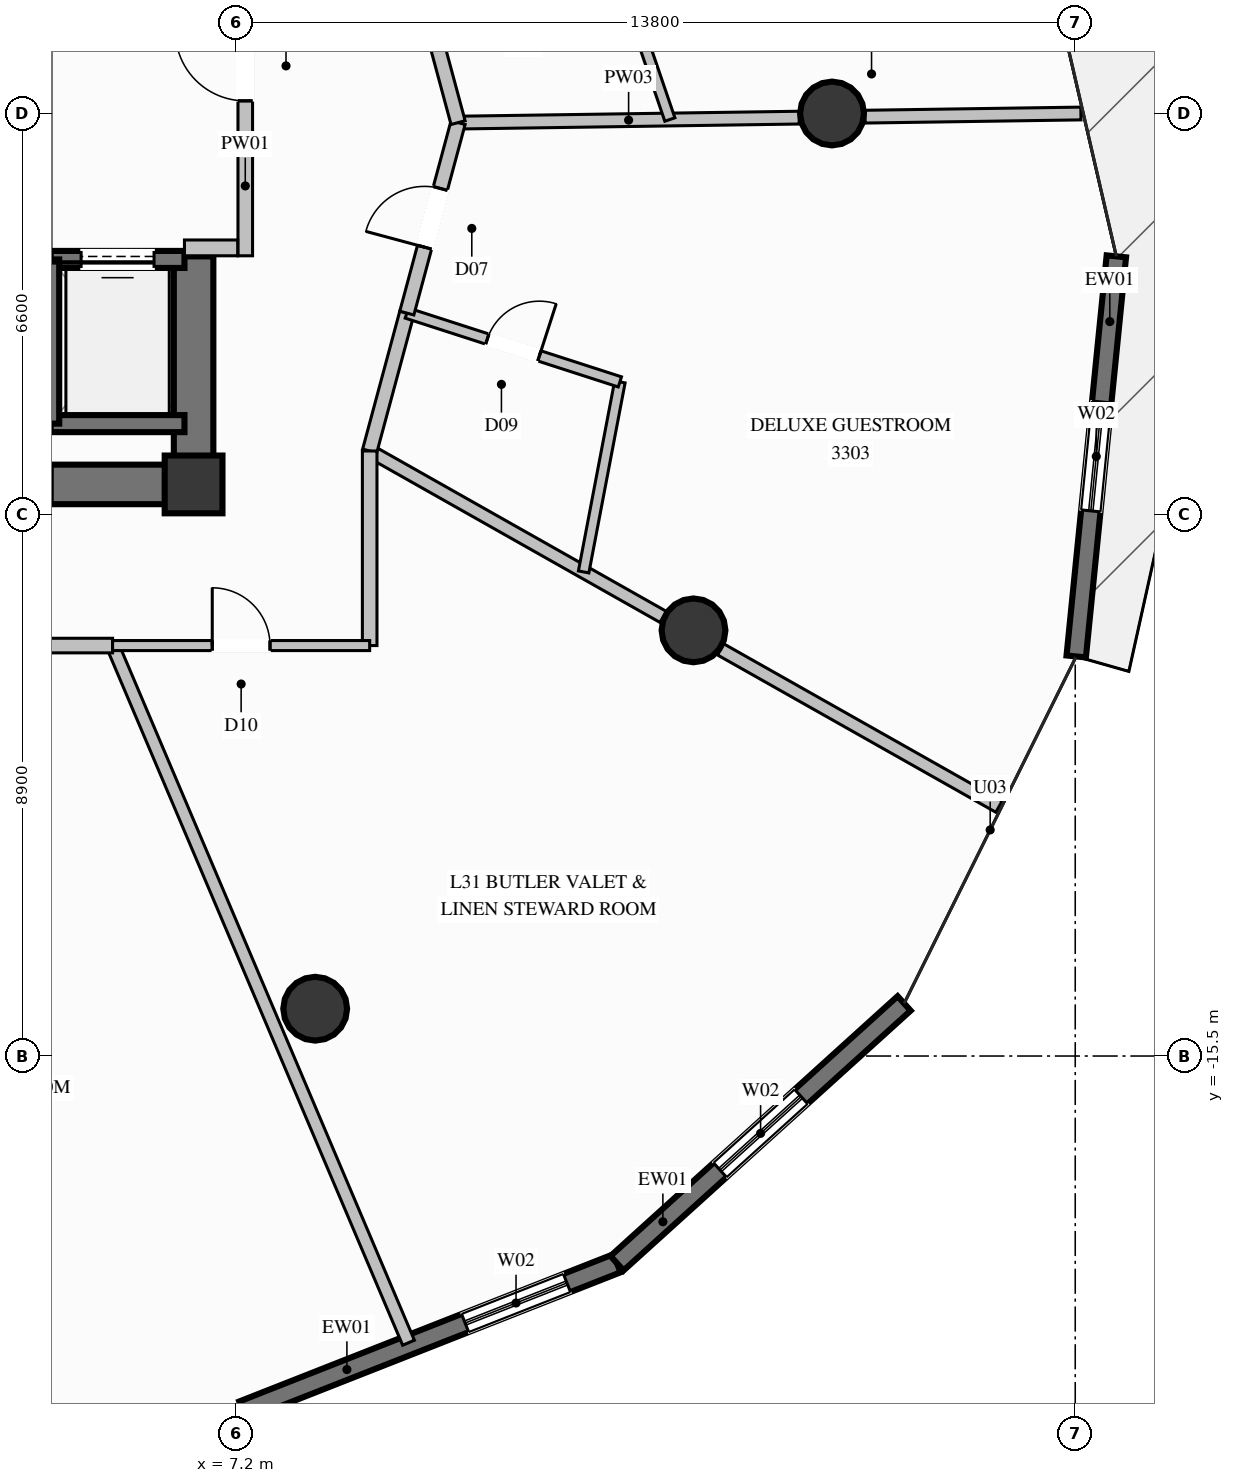
"""IFC4 building model, lengths in metres.
Left out: names, types, materials, properties, quantities, classifications, styles, units other than length and angle.
Written with IfcOpenShell. Run it as: python <this file> out.ifc"""

import sys

from ifc_helpers import new_model, si_unit, direction, frame, frame_2d, origin, origin_2d, place, context, subcontext, project, spatial, rectangle, circle, extrude, element, fill, save


model = new_model("IFC4")
c1 = context("Model", 3, precision=1e-05, world=origin(), true_north=direction((0.0, 1.0)))
c2 = subcontext(c1, "Body", "Model", "MODEL_VIEW")
j1 = project(units=[si_unit("LENGTHUNIT", "METRE"), si_unit("PLANEANGLEUNIT", "RADIAN")], contexts=[c1])
p1 = place(None, origin())
s1 = spatial("IfcSite", under=j1, at=p1, CompositionType="ELEMENT")
p2 = place(p1, origin())
s2 = spatial("IfcBuilding", under=s1, at=p2, CompositionType="ELEMENT")
p3 = place(p2, frame((0.0, 0.0, 124.2)))
s3 = spatial("IfcBuildingStorey", under=s2, at=p3, CompositionType="ELEMENT", Elevation=124.2)
p4 = place(p3, frame((6.5, -6.1, 0.0), z_axis=(0.0, 0.0, 1.0), x_axis=(1.0, 0.0, 0.0)))
e1 = element("IfcColumn", 1, at=p4, inside=s3, PredefinedType="COLUMN", context=c2, shape_type="SweptSolid", body=[
    extrude(rectangle(XDim=0.95, YDim=0.95, at=origin_2d()), origin(), (0.0, 0.0, 1.0), 3.6),
])
p5 = place(p3, frame((4.15, -6.1, 0.0), z_axis=(0.0, 0.0, 1.0), x_axis=(1.0, 0.0, 0.0)))
e2 = element("IfcWall", 2, at=p5, inside=s3, PredefinedType="SHEAR", context=c2, shape_type="SweptSolid", body=[
    extrude(rectangle(XDim=2.025, YDim=0.65, at=frame_2d((1.013, 0.0))), origin(), (0.0, 0.0, 1.0), 3.6),
])
p6 = place(p3, frame((6.5, -6.425, 0.0), z_axis=(0.0, 0.0, 1.0), x_axis=(0.0, 1.0, 0.0)))
e3 = element("IfcWall", 3, at=p6, inside=s3, PredefinedType="SHEAR", context=c2, shape_type="SweptSolid", body=[
    extrude(rectangle(XDim=4.075, YDim=0.65, at=frame_2d((2.038, 0.0))), origin(), (0.0, 0.0, 1.0), 3.6),
])
for number, where, z_axis, x_axis in (
    (4, (17.0, 0.0, 0.0), (0.0, 0.0, 1.0), (1.0, 0.0, 0.0)),
    (5, (8.5, -14.722, 0.0), (0.0, 0.0, 1.0), (1.0, 0.0, 0.0)),
    (6, (14.722, -8.5, 0.0), (0.0, 0.0, 1.0), (1.0, 0.0, 0.0)),
):
    element("IfcColumn", number, at=place(p3, frame(where, z_axis=z_axis, x_axis=x_axis)), inside=s3, PredefinedType="COLUMN", context=c2, shape_type="SweptSolid", body=[
        extrude(circle(Radius=0.525, at=origin_2d()), origin(), (0.0, 0.0, 1.0), 3.6),
    ])
p7 = place(p3, frame((21.676, -2.349, 0.0), z_axis=(0.0, 0.0, 1.0), x_axis=(-0.099792488455, -0.995008270944, 0.0)))
e7 = element("IfcWall", 7, at=p7, inside=s3, PredefinedType="SOLIDWALL", context=c2, shape_type="SweptSolid", body=[
    extrude(rectangle(XDim=6.613, YDim=0.32, at=frame_2d((3.306, 0.0))), origin(), (0.0, 0.0, 1.0), 3.35),
])
p8 = place(p7, frame((2.407, 0.0, 0.35)))
e8 = element("IfcOpeningElement", 8, at=p8, cuts=e7, PredefinedType="OPENING", context=c2, shape_type="SweptSolid", body=[
    extrude(rectangle(XDim=1.8, YDim=2.6, at=frame_2d((0.9, 1.3))), frame((0.0, 0.17, 0.0), z_axis=(0.0, -1.0, 0.0), x_axis=(1.0, 0.0, 0.0)), (0.0, 0.0, 1.0), 0.34),
])
p9 = place(p3, frame((13.464, -18.908, 0.0), z_axis=(0.0, 0.0, 1.0), x_axis=(-0.930522028172, -0.366235928175, 0.0)))
e9 = element("IfcWall", 9, at=p9, inside=s3, PredefinedType="SOLIDWALL", context=c2, shape_type="SweptSolid", body=[
    extrude(rectangle(XDim=6.614, YDim=0.32, at=frame_2d((3.307, 0.0))), origin(), (0.0, 0.0, 1.0), 3.35),
])
p10 = place(p9, frame((0.885, 0.0, 0.35)))
e10 = element("IfcOpeningElement", 10, at=p10, cuts=e9, PredefinedType="OPENING", context=c2, shape_type="SweptSolid", body=[
    extrude(rectangle(XDim=1.8, YDim=2.6, at=frame_2d((0.9, 1.3))), frame((0.0, 0.17, 0.0), z_axis=(0.0, -1.0, 0.0), x_axis=(1.0, 0.0, 0.0)), (0.0, 0.0, 1.0), 0.34),
])
p11 = place(p3, frame((18.186, -14.635, 0.0), z_axis=(0.0, 0.0, 1.0), x_axis=(-0.741478557534, -0.670976563464, 0.0)))
e11 = element("IfcWall", 11, at=p11, inside=s3, PredefinedType="SOLIDWALL", context=c2, shape_type="SweptSolid", body=[
    extrude(rectangle(XDim=6.368, YDim=0.32, at=frame_2d((3.184, 0.0))), origin(), (0.0, 0.0, 1.0), 3.35),
])
p12 = place(p11, frame((2.284, 0.0, 0.35)))
e12 = element("IfcOpeningElement", 12, at=p12, cuts=e11, PredefinedType="OPENING", context=c2, shape_type="SweptSolid", body=[
    extrude(rectangle(XDim=1.8, YDim=2.6, at=frame_2d((0.9, 1.3))), frame((0.0, 0.17, 0.0), z_axis=(0.0, -1.0, 0.0), x_axis=(1.0, 0.0, 0.0)), (0.0, 0.0, 1.0), 0.34),
])
p13 = place(p3, frame((4.15, -5.1, 0.0), z_axis=(0.0, 0.0, 1.0), x_axis=(1.0, 0.0, 0.0)))
e13 = element("IfcWall", 13, at=p13, inside=s3, PredefinedType="SOLIDWALL", context=c2, shape_type="SweptSolid", body=[
    extrude(rectangle(XDim=2.2, YDim=0.28, at=frame_2d((1.1, 0.0))), origin(), (0.0, 0.0, 1.0), 3.35),
])
p14 = place(p3, frame((6.35, -2.4, 0.0), z_axis=(0.0, 0.0, 1.0), x_axis=(-1.0, 0.0, 0.0)))
e14 = element("IfcWall", 14, at=p14, inside=s3, PredefinedType="SOLIDWALL", context=c2, shape_type="SweptSolid", body=[
    extrude(rectangle(XDim=2.2, YDim=0.28, at=frame_2d((1.1, 0.0))), origin(), (0.0, 0.0, 1.0), 3.35),
])
p15 = place(p14, frame((0.5, 0.0, 0.0)))
e15 = element("IfcOpeningElement", 15, at=p15, cuts=e14, PredefinedType="OPENING", context=c2, shape_type="SweptSolid", body=[
    extrude(rectangle(XDim=1.2, YDim=2.2, at=frame_2d((0.6, 1.1))), frame((0.0, 0.15, 0.0), z_axis=(0.0, -1.0, 0.0), x_axis=(1.0, 0.0, 0.0)), (0.0, 0.0, 1.0), 0.3),
])
p16 = place(p3, frame((4.15, -2.4, 0.0), z_axis=(0.0, 0.0, 1.0), x_axis=(0.0, -1.0, 0.0)))
e16 = element("IfcWall", 16, at=p16, inside=s3, PredefinedType="SOLIDWALL", context=c2, shape_type="SweptSolid", body=[
    extrude(rectangle(XDim=2.7, YDim=0.28, at=frame_2d((1.35, 0.0))), origin(), (0.0, 0.0, 1.0), 3.35),
])
p17 = place(p3, frame((7.35, -2.34, 0.0), z_axis=(0.0, 0.0, 1.0), x_axis=(0.0, 1.0, 0.0)))
e17 = element("IfcWall", 17, at=p17, inside=s3, PredefinedType="PARTITIONING", context=c2, shape_type="SweptSolid", body=[
    extrude(rectangle(XDim=5.07, YDim=0.24, at=frame_2d((2.535, 0.0))), origin(), (0.0, 0.0, 1.0), 2.435),
])
p18 = place(p17, frame((2.548, 0.0, 0.0)))
e18 = element("IfcOpeningElement", 18, at=p18, cuts=e17, PredefinedType="OPENING", context=c2, shape_type="SweptSolid", body=[
    extrude(rectangle(XDim=1.15, YDim=2.2, at=frame_2d((0.575, 1.1))), frame((0.0, 0.13, 0.0), z_axis=(0.0, -1.0, 0.0), x_axis=(1.0, 0.0, 0.0)), (0.0, 0.0, 1.0), 0.26),
])
p19 = place(p3, frame((6.35, -2.21, 0.0), z_axis=(0.0, 0.0, 1.0), x_axis=(1.0, 0.0, 0.0)))
e19 = element("IfcWall", 19, at=p19, inside=s3, PredefinedType="PARTITIONING", context=c2, shape_type="SweptSolid", body=[
    extrude(rectangle(XDim=0.875, YDim=0.26, at=frame_2d((0.438, 0.0))), origin(), (0.0, 0.0, 1.0), 3.35),
])
p20 = place(p3, frame((10.85, -0.15, 0.0), z_axis=(0.0, 0.0, 1.0), x_axis=(0.999893703948, 0.014580151076, 0.0)))
e20 = element("IfcWall", 20, at=p20, inside=s3, PredefinedType="PARTITIONING", context=c2, shape_type="SweptSolid", body=[
    extrude(rectangle(XDim=5.609, YDim=0.21, at=frame_2d((2.805, 0.0))), origin(), (0.0, 0.0, 1.0), 3.35),
])
p21 = place(p3, frame((17.543, -0.052, 0.0), z_axis=(0.0, 0.0, 1.0), x_axis=(0.999892731853, 0.014646664733, 0.0)))
e21 = element("IfcWall", 21, at=p21, inside=s3, PredefinedType="PARTITIONING", context=c2, shape_type="SweptSolid", body=[
    extrude(rectangle(XDim=3.551, YDim=0.21, at=frame_2d((1.775, 0.0))), origin(), (0.0, 0.0, 1.0), 3.35),
])
p22 = place(p3, frame((9.396, -5.55, 0.0), z_axis=(0.0, 0.0, 1.0), x_axis=(0.870557919432, -0.492065959922, 0.0)))
e22 = element("IfcWall", 22, at=p22, inside=s3, PredefinedType="PARTITIONING", context=c2, shape_type="SweptSolid", body=[
    extrude(rectangle(XDim=5.546, YDim=0.21, at=frame_2d((2.773, 0.0))), origin(), (0.0, 0.0, 1.0), 2.791),
])
p23 = place(p3, frame((15.168, -8.813, 0.0), z_axis=(0.0, 0.0, 1.0), x_axis=(0.870621632691, -0.491953222056, 0.0)))
e23 = element("IfcWall", 23, at=p23, inside=s3, PredefinedType="PARTITIONING", context=c2, shape_type="SweptSolid", body=[
    extrude(rectangle(XDim=5.259, YDim=0.21, at=frame_2d((2.629, 0.0))), origin(), (0.0, 0.0, 1.0), 3.35),
])
p24 = place(p3, frame((9.396, -5.55, 0.0), z_axis=(0.0, 0.0, 1.0), x_axis=(0.260152382661, 0.965567572879, 0.0)))
e24 = element("IfcWall", 24, at=p24, inside=s3, PredefinedType="PARTITIONING", context=c2, shape_type="SweptSolid", body=[
    extrude(rectangle(XDim=2.349, YDim=0.24, at=frame_2d((1.174, 0.0))), origin(), (0.0, 0.0, 1.0), 3.35),
])
p25 = place(p3, frame((12.915, -7.539, 0.0), z_axis=(0.0, 0.0, 1.0), x_axis=(0.187327216093, 0.982297569024, 0.0)))
e25 = element("IfcWall", 25, at=p25, inside=s3, PredefinedType="PLUMBINGWALL", context=c2, shape_type="SweptSolid", body=[
    extrude(rectangle(XDim=3.181, YDim=0.175, at=frame_2d((1.591, 0.0))), origin(), (0.0, 0.0, 1.0), 3.35),
])
p26 = place(p3, frame((10.007, -3.282, 0.0), z_axis=(0.0, 0.0, 1.0), x_axis=(0.951566663579, -0.307442490177, 0.0)))
e26 = element("IfcWall", 26, at=p26, inside=s3, PredefinedType="PLUMBINGWALL", context=c2, shape_type="SweptSolid", body=[
    extrude(rectangle(XDim=3.682, YDim=0.175, at=frame_2d((1.841, 0.0))), origin(), (0.0, 0.0, 1.0), 3.35),
])
p27 = place(p26, frame((1.391, 0.0, 0.0)))
e27 = element("IfcOpeningElement", 27, at=p27, cuts=e26, PredefinedType="OPENING", context=c2, shape_type="SweptSolid", body=[
    extrude(rectangle(XDim=0.9, YDim=2.1, at=frame_2d((0.45, 1.05))), frame((0.0, 0.098, 0.0), z_axis=(0.0, -1.0, 0.0), x_axis=(1.0, 0.0, 0.0)), (0.0, 0.0, 1.0), 0.195),
])
p28 = place(p3, frame((10.007, -3.282, 0.0), z_axis=(0.0, 0.0, 1.0), x_axis=(0.259905989708, 0.965633924691, 0.0)))
e28 = element("IfcWall", 28, at=p28, inside=s3, PredefinedType="PARTITIONING", context=c2, shape_type="SweptSolid", body=[
    extrude(rectangle(XDim=3.244, YDim=0.24, at=frame_2d((1.622, 0.0))), origin(), (0.0, 0.0, 1.0), 2.985),
])
p29 = place(p28, frame((1.122, 0.0, 0.0)))
e29 = element("IfcOpeningElement", 29, at=p29, cuts=e28, PredefinedType="OPENING", context=c2, shape_type="SweptSolid", body=[
    extrude(rectangle(XDim=1.0, YDim=2.2, at=frame_2d((0.5, 1.1))), frame((0.0, 0.13, 0.0), z_axis=(0.0, -1.0, 0.0), x_axis=(1.0, 0.0, 0.0)), (0.0, 0.0, 1.0), 0.26),
])
p30 = place(p3, frame((10.85, -0.15, 0.0), z_axis=(0.0, 0.0, 1.0), x_axis=(-0.260178493416, 0.965560537493, 0.0)))
e30 = element("IfcWall", 30, at=p30, inside=s3, PredefinedType="PARTITIONING", context=c2, shape_type="SweptSolid", body=[
    extrude(rectangle(XDim=2.349, YDim=0.24, at=frame_2d((1.174, 0.0))), origin(), (0.0, 0.0, 1.0), 2.985),
])
p31 = place(p3, frame((14.333, -0.099, 0.0), z_axis=(0.0, 0.0, 1.0), x_axis=(-0.322964477687, 0.946411087294, 0.0)))
e31 = element("IfcWall", 31, at=p31, inside=s3, PredefinedType="PLUMBINGWALL", context=c2, shape_type="SweptSolid", body=[
    extrude(rectangle(XDim=3.062, YDim=0.175, at=frame_2d((1.531, 0.0))), origin(), (0.0, 0.0, 1.0), 3.35),
])
p32 = place(p3, frame((5.168, -8.75, 0.0), z_axis=(0.0, 0.0, 1.0), x_axis=(0.390751692608, -0.920496124231, 0.0)))
e32 = element("IfcWall", 32, at=p32, inside=s3, PredefinedType="PARTITIONING", context=c2, shape_type="SweptSolid", body=[
    extrude(rectangle(XDim=12.455, YDim=0.21, at=frame_2d((6.228, 0.0))), origin(), (0.0, 0.0, 1.0), 3.35),
])
p33 = place(p3, frame((0.0, -8.75, 0.0), z_axis=(0.0, 0.0, 1.0), x_axis=(1.0, 0.0, 0.0)))
e33 = element("IfcWall", 33, at=p33, inside=s3, PredefinedType="PARTITIONING", context=c2, shape_type="SweptSolid", body=[
    extrude(rectangle(XDim=5.168, YDim=0.24, at=frame_2d((2.584, 0.0))), origin(), (0.0, 0.0, 1.0), 3.35),
])
p34 = place(p33, frame((2.084, 0.0, 0.0)))
e34 = element("IfcOpeningElement", 34, at=p34, cuts=e33, PredefinedType="OPENING", context=c2, shape_type="SweptSolid", body=[
    extrude(rectangle(XDim=1.0, YDim=2.2, at=frame_2d((0.5, 1.1))), frame((0.0, 0.13, 0.0), z_axis=(0.0, -1.0, 0.0), x_axis=(1.0, 0.0, 0.0)), (0.0, 0.0, 1.0), 0.26),
])
p35 = place(p3, frame((9.396, -8.75, 0.0), z_axis=(0.0, 0.0, 1.0), x_axis=(0.0, 1.0, 0.0)))
e35 = element("IfcWall", 35, at=p35, inside=s3, PredefinedType="PARTITIONING", context=c2, shape_type="SweptSolid", body=[
    extrude(rectangle(XDim=3.2, YDim=0.24, at=frame_2d((1.6, 0.0))), origin(), (0.0, 0.0, 1.0), 3.35),
])
p36 = place(p3, frame((5.168, -8.75, 0.0), z_axis=(0.0, 0.0, 1.0), x_axis=(1.0, 0.0, 0.0)))
e36 = element("IfcWall", 36, at=p36, inside=s3, PredefinedType="PARTITIONING", context=c2, shape_type="SweptSolid", body=[
    extrude(rectangle(XDim=4.228, YDim=0.165, at=frame_2d((2.114, 0.0))), origin(), (0.0, 0.0, 1.0), 3.35),
])
p37 = place(p36, frame((1.639, 0.0, 0.0)))
e37 = element("IfcOpeningElement", 37, at=p37, cuts=e36, PredefinedType="OPENING", context=c2, shape_type="SweptSolid", body=[
    extrude(rectangle(XDim=0.95, YDim=2.1, at=frame_2d((0.475, 1.05))), frame((0.0, 0.093, 0.0), z_axis=(0.0, -1.0, 0.0), x_axis=(1.0, 0.0, 0.0)), (0.0, 0.0, 1.0), 0.185),
])
p38 = place(p8, origin())
e38 = element("IfcWindow", 38, at=p38, inside=s3, PartitioningType="SINGLE_PANEL", PredefinedType="WINDOW", context=c2, shape_type="SweptSolid", body=[
    extrude(rectangle(XDim=1.8, YDim=2.6, at=frame_2d((0.9, 1.3))), frame((0.0, 0.03, 0.0), z_axis=(0.0, -1.0, 0.0), x_axis=(1.0, 0.0, 0.0)), (0.0, 0.0, 1.0), 0.06),
])
fill(e8, e38)
p39 = place(p10, origin())
e39 = element("IfcWindow", 39, at=p39, inside=s3, PartitioningType="SINGLE_PANEL", PredefinedType="WINDOW", context=c2, shape_type="SweptSolid", body=[
    extrude(rectangle(XDim=1.8, YDim=2.6, at=frame_2d((0.9, 1.3))), frame((0.0, 0.03, 0.0), z_axis=(0.0, -1.0, 0.0), x_axis=(1.0, 0.0, 0.0)), (0.0, 0.0, 1.0), 0.06),
])
fill(e10, e39)
p40 = place(p12, origin())
e40 = element("IfcWindow", 40, at=p40, inside=s3, PartitioningType="SINGLE_PANEL", PredefinedType="WINDOW", context=c2, shape_type="SweptSolid", body=[
    extrude(rectangle(XDim=1.8, YDim=2.6, at=frame_2d((0.9, 1.3))), frame((0.0, 0.03, 0.0), z_axis=(0.0, -1.0, 0.0), x_axis=(1.0, 0.0, 0.0)), (0.0, 0.0, 1.0), 0.06),
])
fill(e12, e40)
p41 = place(p15, origin())
e41 = element("IfcDoor", 41, at=p41, inside=s3, OperationType="SLIDING_TO_LEFT", PredefinedType="DOOR", context=c2, shape_type="SweptSolid", body=[
    extrude(rectangle(XDim=1.2, YDim=2.2, at=frame_2d((0.6, 1.1))), frame((0.0, 0.025, 0.0), z_axis=(0.0, -1.0, 0.0), x_axis=(1.0, 0.0, 0.0)), (0.0, 0.0, 1.0), 0.05),
])
fill(e15, e41)
p42 = place(p18, origin())
e42 = element("IfcDoor", 42, at=p42, inside=s3, OperationType="SINGLE_SWING_RIGHT", PredefinedType="DOOR", context=c2, shape_type="SweptSolid", body=[
    extrude(rectangle(XDim=1.15, YDim=2.2, at=frame_2d((0.575, 1.1))), frame((0.0, 0.025, 0.0), z_axis=(0.0, -1.0, 0.0), x_axis=(1.0, 0.0, 0.0)), (0.0, 0.0, 1.0), 0.05),
])
fill(e18, e42)
p43 = place(p27, origin())
e43 = element("IfcDoor", 43, at=p43, inside=s3, OperationType="SINGLE_SWING_RIGHT", PredefinedType="DOOR", context=c2, shape_type="SweptSolid", body=[
    extrude(rectangle(XDim=0.9, YDim=2.1, at=frame_2d((0.45, 1.05))), frame((0.0, 0.025, 0.0), z_axis=(0.0, -1.0, 0.0), x_axis=(1.0, 0.0, 0.0)), (0.0, 0.0, 1.0), 0.05),
])
fill(e27, e43)
p44 = place(p29, origin())
e44 = element("IfcDoor", 44, at=p44, inside=s3, OperationType="SINGLE_SWING_LEFT", PredefinedType="DOOR", context=c2, shape_type="SweptSolid", body=[
    extrude(rectangle(XDim=1.0, YDim=2.2, at=frame_2d((0.5, 1.1))), frame((0.0, 0.025, 0.0), z_axis=(0.0, -1.0, 0.0), x_axis=(1.0, 0.0, 0.0)), (0.0, 0.0, 1.0), 0.05),
])
fill(e29, e44)
p45 = place(p37, origin())
e45 = element("IfcDoor", 45, at=p45, inside=s3, OperationType="SINGLE_SWING_LEFT", PredefinedType="DOOR", context=c2, shape_type="SweptSolid", body=[
    extrude(rectangle(XDim=0.95, YDim=2.1, at=frame_2d((0.475, 1.05))), frame((0.0, 0.025, 0.0), z_axis=(0.0, -1.0, 0.0), x_axis=(1.0, 0.0, 0.0)), (0.0, 0.0, 1.0), 0.05),
])
fill(e37, e45)
save(model, sys.argv[1])
